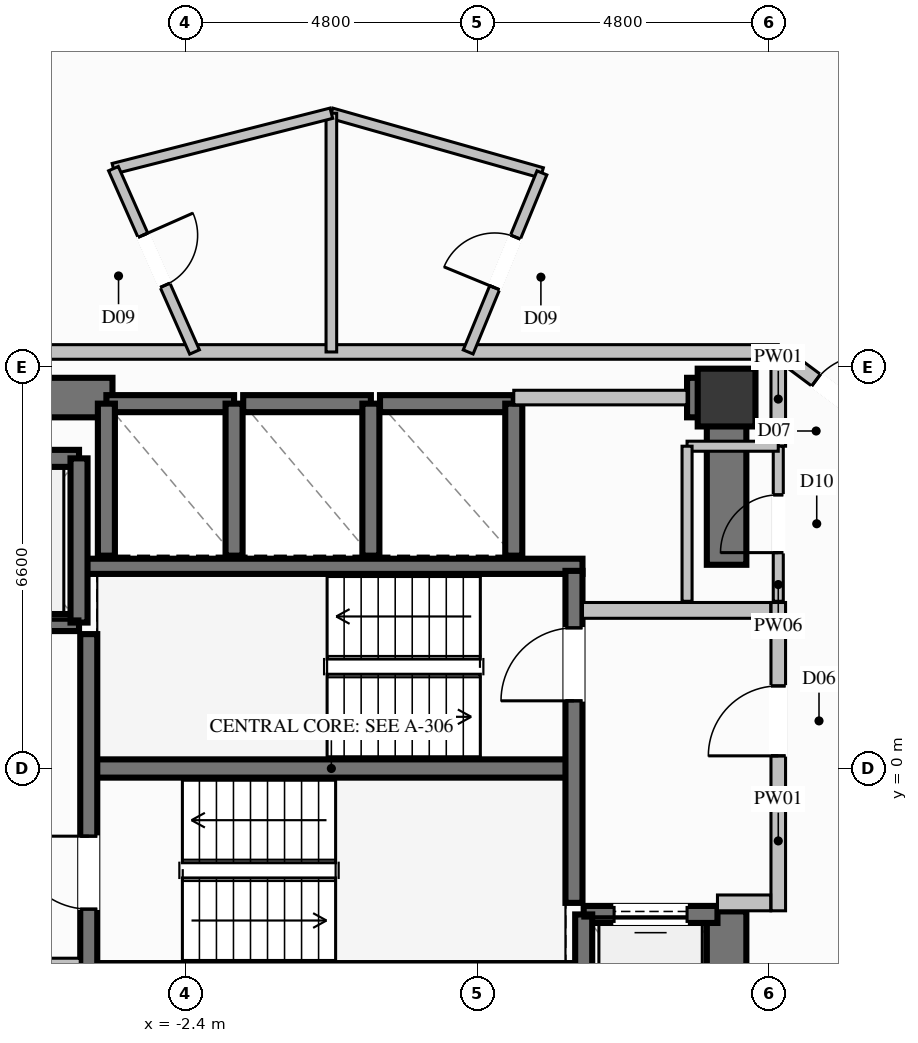
"""IFC4 building model, lengths in metres.
Left out: names, types, materials, properties, quantities, classifications, styles, units other than length and angle.
Written with IfcOpenShell. Run it as: python <this file> out.ifc"""

import sys

from ifc_helpers import new_model, si_unit, direction, frame, frame_2d, origin, origin_2d, place, context, subcontext, project, spatial, rectangle, extrude, element, fill, save


model = new_model("IFC4")
c1 = context("Model", 3, precision=1e-05, world=origin(), true_north=direction((0.0, 1.0)))
c2 = subcontext(c1, "Body", "Model", "MODEL_VIEW")
j1 = project(units=[si_unit("LENGTHUNIT", "METRE"), si_unit("PLANEANGLEUNIT", "RADIAN")], contexts=[c1])
p1 = place(None, origin())
s1 = spatial("IfcSite", under=j1, at=p1, CompositionType="ELEMENT")
p2 = place(p1, origin())
s2 = spatial("IfcBuilding", under=s1, at=p2, CompositionType="ELEMENT")
p3 = place(p2, frame((0.0, 0.0, 102.6)))
s3 = spatial("IfcBuildingStorey", under=s2, at=p3, CompositionType="ELEMENT", Elevation=102.6)
p4 = place(p3, frame((6.5, 6.1, 0.0), z_axis=(0.0, 0.0, 1.0), x_axis=(1.0, 0.0, 0.0)))
e1 = element("IfcColumn", 1, at=p4, inside=s3, PredefinedType="COLUMN", context=c2, shape_type="SweptSolid", body=[
    extrude(rectangle(XDim=0.95, YDim=0.95, at=origin_2d()), origin(), (0.0, 0.0, 1.0), 3.6),
])
p5 = place(p3, frame((-3.99, 0.0, 0.0), z_axis=(0.0, 0.0, 1.0), x_axis=(1.0, 0.0, 0.0)))
e2 = element("IfcWall", 2, at=p5, inside=s3, PredefinedType="SHEAR", context=c2, shape_type="SweptSolid", body=[
    extrude(rectangle(XDim=7.98, YDim=0.3, at=frame_2d((3.99, 0.0))), origin(), (0.0, 0.0, 1.0), 3.6),
])
for number, where, z_axis, x_axis in (
    (3, (-4.13, -3.325, 0.0), (0.0, 0.0, 1.0), (1.0, 0.0, 0.0)),
    (4, (-4.13, 3.325, 0.0), (0.0, 0.0, 1.0), (1.0, 0.0, 0.0)),
):
    element("IfcWall", number, at=place(p3, frame(where, z_axis=z_axis, x_axis=x_axis)), inside=s3, PredefinedType="SOLIDWALL", context=c2, shape_type="SweptSolid", body=[
        extrude(rectangle(XDim=8.26, YDim=0.25, at=frame_2d((4.13, 0.0))), origin(), (0.0, 0.0, 1.0), 3.6),
    ])
p6 = place(p3, frame((-6.175, 6.1, 0.0), z_axis=(0.0, 0.0, 1.0), x_axis=(1.0, 0.0, 0.0)))
e5 = element("IfcWall", 5, at=p6, inside=s3, PredefinedType="SHEAR", context=c2, shape_type="SweptSolid", body=[
    extrude(rectangle(XDim=2.575, YDim=0.65, at=frame_2d((1.288, 0.0))), origin(), (0.0, 0.0, 1.0), 3.6),
])
p7 = place(p3, frame((5.85, 6.1, 0.0), z_axis=(0.0, 0.0, 1.0), x_axis=(1.0, 0.0, 0.0)))
e6 = element("IfcWall", 6, at=p7, inside=s3, PredefinedType="SHEAR", context=c2, shape_type="SweptSolid", body=[
    extrude(rectangle(XDim=0.325, YDim=0.65, at=frame_2d((0.163, 0.0))), origin(), (0.0, 0.0, 1.0), 3.6),
])
p8 = place(p3, frame((6.5, -6.425, 0.0), z_axis=(0.0, 0.0, 1.0), x_axis=(0.0, 1.0, 0.0)))
e7 = element("IfcWall", 7, at=p8, inside=s3, PredefinedType="SHEAR", context=c2, shape_type="SweptSolid", body=[
    extrude(rectangle(XDim=4.075, YDim=0.65, at=frame_2d((2.038, 0.0))), origin(), (0.0, 0.0, 1.0), 3.6),
])
p9 = place(p3, frame((6.5, 3.35, 0.0), z_axis=(0.0, 0.0, 1.0), x_axis=(0.0, 1.0, 0.0)))
e8 = element("IfcWall", 8, at=p9, inside=s3, PredefinedType="SHEAR", context=c2, shape_type="SweptSolid", body=[
    extrude(rectangle(XDim=3.075, YDim=0.65, at=frame_2d((1.538, 0.0))), origin(), (0.0, 0.0, 1.0), 3.6),
])
p10 = place(p3, frame((-1.6, 6.0, 0.0), z_axis=(0.0, 0.0, 1.0), x_axis=(-1.0, 0.0, 0.0)))
e9 = element("IfcWall", 9, at=p10, inside=s3, PredefinedType="SOLIDWALL", context=c2, shape_type="SweptSolid", body=[
    extrude(rectangle(XDim=2.1, YDim=0.28, at=frame_2d((1.05, 0.0))), origin(), (0.0, 0.0, 1.0), 3.35),
])
for number, where, z_axis, x_axis in (
    (10, (-3.7, 6.0, 0.0), (0.0, 0.0, 1.0), (0.0, -1.0, 0.0)),
    (11, (-1.6, 3.5, 0.0), (0.0, 0.0, 1.0), (0.0, 1.0, 0.0)),
):
    element("IfcWall", number, at=place(p3, frame(where, z_axis=z_axis, x_axis=x_axis)), inside=s3, PredefinedType="SOLIDWALL", context=c2, shape_type="SweptSolid", body=[
        extrude(rectangle(XDim=2.5, YDim=0.28, at=frame_2d((1.25, 0.0))), origin(), (0.0, 0.0, 1.0), 3.35),
    ])
p11 = place(p3, frame((0.65, 6.0, 0.0), z_axis=(0.0, 0.0, 1.0), x_axis=(-1.0, 0.0, 0.0)))
e12 = element("IfcWall", 12, at=p11, inside=s3, PredefinedType="SOLIDWALL", context=c2, shape_type="SweptSolid", body=[
    extrude(rectangle(XDim=2.1, YDim=0.28, at=frame_2d((1.05, 0.0))), origin(), (0.0, 0.0, 1.0), 3.35),
])
p12 = place(p3, frame((0.65, 3.5, 0.0), z_axis=(0.0, 0.0, 1.0), x_axis=(0.0, 1.0, 0.0)))
e13 = element("IfcWall", 13, at=p12, inside=s3, PredefinedType="SOLIDWALL", context=c2, shape_type="SweptSolid", body=[
    extrude(rectangle(XDim=2.5, YDim=0.28, at=frame_2d((1.25, 0.0))), origin(), (0.0, 0.0, 1.0), 3.35),
])
p13 = place(p3, frame((3.0, 6.0, 0.0), z_axis=(0.0, 0.0, 1.0), x_axis=(-1.0, 0.0, 0.0)))
e14 = element("IfcWall", 14, at=p13, inside=s3, PredefinedType="SOLIDWALL", context=c2, shape_type="SweptSolid", body=[
    extrude(rectangle(XDim=2.2, YDim=0.28, at=frame_2d((1.1, 0.0))), origin(), (0.0, 0.0, 1.0), 3.35),
])
p14 = place(p3, frame((3.0, 3.5, 0.0), z_axis=(0.0, 0.0, 1.0), x_axis=(0.0, 1.0, 0.0)))
e15 = element("IfcWall", 15, at=p14, inside=s3, PredefinedType="SOLIDWALL", context=c2, shape_type="SweptSolid", body=[
    extrude(rectangle(XDim=2.5, YDim=0.28, at=frame_2d((1.25, 0.0))), origin(), (0.0, 0.0, 1.0), 3.35),
])
p15 = place(p3, frame((-6.35, 2.4, 0.0), z_axis=(0.0, 0.0, 1.0), x_axis=(1.0, 0.0, 0.0)))
e16 = element("IfcWall", 16, at=p15, inside=s3, PredefinedType="SOLIDWALL", context=c2, shape_type="SweptSolid", body=[
    extrude(rectangle(XDim=2.2, YDim=0.28, at=frame_2d((1.1, 0.0))), origin(), (0.0, 0.0, 1.0), 3.35),
])
p16 = place(p15, frame((0.5, 0.0, 0.0)))
e17 = element("IfcOpeningElement", 17, at=p16, cuts=e16, PredefinedType="OPENING", context=c2, shape_type="SweptSolid", body=[
    extrude(rectangle(XDim=1.2, YDim=2.2, at=frame_2d((0.6, 1.1))), frame((0.0, 0.15, 0.0), z_axis=(0.0, -1.0, 0.0), x_axis=(1.0, 0.0, 0.0)), (0.0, 0.0, 1.0), 0.3),
])
p17 = place(p3, frame((-4.15, 5.1, 0.0), z_axis=(0.0, 0.0, 1.0), x_axis=(-1.0, 0.0, 0.0)))
e18 = element("IfcWall", 18, at=p17, inside=s3, PredefinedType="SOLIDWALL", context=c2, shape_type="SweptSolid", body=[
    extrude(rectangle(XDim=2.2, YDim=0.28, at=frame_2d((1.1, 0.0))), origin(), (0.0, 0.0, 1.0), 3.35),
])
p18 = place(p3, frame((-4.15, 2.4, 0.0), z_axis=(0.0, 0.0, 1.0), x_axis=(0.0, 1.0, 0.0)))
e19 = element("IfcWall", 19, at=p18, inside=s3, PredefinedType="SOLIDWALL", context=c2, shape_type="SweptSolid", body=[
    extrude(rectangle(XDim=2.7, YDim=0.28, at=frame_2d((1.35, 0.0))), origin(), (0.0, 0.0, 1.0), 3.35),
])
p19 = place(p3, frame((6.35, -2.4, 0.0), z_axis=(0.0, 0.0, 1.0), x_axis=(-1.0, 0.0, 0.0)))
e20 = element("IfcWall", 20, at=p19, inside=s3, PredefinedType="SOLIDWALL", context=c2, shape_type="SweptSolid", body=[
    extrude(rectangle(XDim=2.2, YDim=0.28, at=frame_2d((1.1, 0.0))), origin(), (0.0, 0.0, 1.0), 3.35),
])
p20 = place(p19, frame((0.5, 0.0, 0.0)))
e21 = element("IfcOpeningElement", 21, at=p20, cuts=e20, PredefinedType="OPENING", context=c2, shape_type="SweptSolid", body=[
    extrude(rectangle(XDim=1.2, YDim=2.2, at=frame_2d((0.6, 1.1))), frame((0.0, 0.15, 0.0), z_axis=(0.0, -1.0, 0.0), x_axis=(1.0, 0.0, 0.0)), (0.0, 0.0, 1.0), 0.3),
])
p21 = place(p3, frame((4.15, -2.4, 0.0), z_axis=(0.0, 0.0, 1.0), x_axis=(0.0, -1.0, 0.0)))
e22 = element("IfcWall", 22, at=p21, inside=s3, PredefinedType="SOLIDWALL", context=c2, shape_type="SweptSolid", body=[
    extrude(rectangle(XDim=2.7, YDim=0.28, at=frame_2d((1.35, 0.0))), origin(), (0.0, 0.0, 1.0), 3.35),
])
p22 = place(p3, frame((-3.99, -3.25, 0.0), z_axis=(0.0, 0.0, 1.0), x_axis=(0.0, 1.0, 0.0)))
e23 = element("IfcWall", 23, at=p22, inside=s3, PredefinedType="SOLIDWALL", context=c2, shape_type="SweptSolid", body=[
    extrude(rectangle(XDim=5.46, YDim=0.28, at=frame_2d((2.73, 0.0))), origin(), (0.0, 0.0, 1.0), 3.35),
])
p23 = place(p22, frame((0.937, 0.0, 0.0)))
e24 = element("IfcOpeningElement", 24, at=p23, cuts=e23, PredefinedType="OPENING", context=c2, shape_type="SweptSolid", body=[
    extrude(rectangle(XDim=1.2, YDim=2.2, at=frame_2d((0.6, 1.1))), frame((0.0, 0.15, 0.0), z_axis=(0.0, -1.0, 0.0), x_axis=(1.0, 0.0, 0.0)), (0.0, 0.0, 1.0), 0.3),
])
p24 = place(p3, frame((3.99, -2.21, 0.0), z_axis=(0.0, 0.0, 1.0), x_axis=(0.0, 1.0, 0.0)))
e25 = element("IfcWall", 25, at=p24, inside=s3, PredefinedType="SOLIDWALL", context=c2, shape_type="SweptSolid", body=[
    extrude(rectangle(XDim=5.46, YDim=0.28, at=frame_2d((2.73, 0.0))), origin(), (0.0, 0.0, 1.0), 3.35),
])
p25 = place(p24, frame((3.323, 0.0, 0.0)))
e26 = element("IfcOpeningElement", 26, at=p25, cuts=e25, PredefinedType="OPENING", context=c2, shape_type="SweptSolid", body=[
    extrude(rectangle(XDim=1.2, YDim=2.2, at=frame_2d((0.6, 1.1))), frame((0.0, 0.15, 0.0), z_axis=(0.0, -1.0, 0.0), x_axis=(1.0, 0.0, 0.0)), (0.0, 0.0, 1.0), 0.3),
])
p26 = place(p3, frame((-7.225, -3.25, 0.0), z_axis=(0.0, 0.0, 1.0), x_axis=(1.0, 0.0, 0.0)))
e27 = element("IfcWall", 27, at=p26, inside=s3, PredefinedType="PARTITIONING", context=c2, shape_type="SweptSolid", body=[
    extrude(rectangle(XDim=3.095, YDim=0.26, at=frame_2d((1.548, 0.0))), origin(), (0.0, 0.0, 1.0), 3.35),
])
p27 = place(p3, frame((7.35, -2.34, 0.0), z_axis=(0.0, 0.0, 1.0), x_axis=(0.0, 1.0, 0.0)))
e28 = element("IfcWall", 28, at=p27, inside=s3, PredefinedType="PARTITIONING", context=c2, shape_type="SweptSolid", body=[
    extrude(rectangle(XDim=5.07, YDim=0.24, at=frame_2d((2.535, 0.0))), origin(), (0.0, 0.0, 1.0), 2.435),
])
p28 = place(p27, frame((2.548, 0.0, 0.0)))
e29 = element("IfcOpeningElement", 29, at=p28, cuts=e28, PredefinedType="OPENING", context=c2, shape_type="SweptSolid", body=[
    extrude(rectangle(XDim=1.15, YDim=2.2, at=frame_2d((0.575, 1.1))), frame((0.0, 0.13, 0.0), z_axis=(0.0, -1.0, 0.0), x_axis=(1.0, 0.0, 0.0)), (0.0, 0.0, 1.0), 0.26),
])
p29 = place(p3, frame((6.35, -2.21, 0.0), z_axis=(0.0, 0.0, 1.0), x_axis=(1.0, 0.0, 0.0)))
e30 = element("IfcWall", 30, at=p29, inside=s3, PredefinedType="PARTITIONING", context=c2, shape_type="SweptSolid", body=[
    extrude(rectangle(XDim=0.875, YDim=0.26, at=frame_2d((0.438, 0.0))), origin(), (0.0, 0.0, 1.0), 3.35),
])
p30 = place(p3, frame((4.13, 2.6, 0.0), z_axis=(0.0, 0.0, 1.0), x_axis=(1.0, 0.0, 0.0)))
e31 = element("IfcWall", 31, at=p30, inside=s3, PredefinedType="PARTITIONING", context=c2, shape_type="SweptSolid", body=[
    extrude(rectangle(XDim=3.095, YDim=0.26, at=frame_2d((1.548, 0.0))), origin(), (0.0, 0.0, 1.0), 3.35),
])
p31 = place(p3, frame((-7.35, 6.85, 0.0), z_axis=(0.0, 0.0, 1.0), x_axis=(1.0, 0.0, 0.0)))
e32 = element("IfcWall", 32, at=p31, inside=s3, PredefinedType="PARTITIONING", context=c2, shape_type="SweptSolid", body=[
    extrude(rectangle(XDim=14.7, YDim=0.24, at=frame_2d((7.35, 0.0))), origin(), (0.0, 0.0, 1.0), 2.435),
])
p32 = place(p3, frame((7.35, 5.3, 0.0), z_axis=(0.0, 0.0, 1.0), x_axis=(0.0, 1.0, 0.0)))
e33 = element("IfcWall", 33, at=p32, inside=s3, PredefinedType="PARTITIONING", context=c2, shape_type="SweptSolid", body=[
    extrude(rectangle(XDim=1.55, YDim=0.24, at=frame_2d((0.775, 0.0))), origin(), (0.0, 0.0, 1.0), 2.435),
])
p33 = place(p3, frame((3.0, 6.1, 0.0), z_axis=(0.0, 0.0, 1.0), x_axis=(1.0, 0.0, 0.0)))
e34 = element("IfcWall", 34, at=p33, inside=s3, PredefinedType="PARTITIONING", context=c2, shape_type="SweptSolid", body=[
    extrude(rectangle(XDim=2.85, YDim=0.24, at=frame_2d((1.425, 0.0))), origin(), (0.0, 0.0, 1.0), 2.435),
])
p34 = place(p3, frame((7.35, 2.75, 0.0), z_axis=(0.0, 0.0, 1.0), x_axis=(0.0, 1.0, 0.0)))
e35 = element("IfcWall", 35, at=p34, inside=s3, PredefinedType="PARTITIONING", context=c2, shape_type="SweptSolid", body=[
    extrude(rectangle(XDim=2.55, YDim=0.165, at=frame_2d((1.275, 0.0))), origin(), (0.0, 0.0, 1.0), 3.35),
])
p35 = place(p34, frame((0.8, 0.0, 0.0)))
e36 = element("IfcOpeningElement", 36, at=p35, cuts=e35, PredefinedType="OPENING", context=c2, shape_type="SweptSolid", body=[
    extrude(rectangle(XDim=0.95, YDim=2.1, at=frame_2d((0.475, 1.05))), frame((0.0, 0.093, 0.0), z_axis=(0.0, -1.0, 0.0), x_axis=(1.0, 0.0, 0.0)), (0.0, 0.0, 1.0), 0.185),
])
p36 = place(p3, frame((7.35, 5.3, 0.0), z_axis=(0.0, 0.0, 1.0), x_axis=(-1.0, 0.0, 0.0)))
e37 = element("IfcWall", 37, at=p36, inside=s3, PredefinedType="PARTITIONING", context=c2, shape_type="SweptSolid", body=[
    extrude(rectangle(XDim=1.5, YDim=0.165, at=frame_2d((0.75, 0.0))), origin(), (0.0, 0.0, 1.0), 2.435),
])
p37 = place(p3, frame((5.85, 5.3, 0.0), z_axis=(0.0, 0.0, 1.0), x_axis=(0.0, -1.0, 0.0)))
e38 = element("IfcWall", 38, at=p37, inside=s3, PredefinedType="PARTITIONING", context=c2, shape_type="SweptSolid", body=[
    extrude(rectangle(XDim=2.55, YDim=0.165, at=frame_2d((1.275, 0.0))), origin(), (0.0, 0.0, 1.0), 2.435),
])
p38 = place(p3, frame((0.0, 10.776, 0.0), z_axis=(0.0, 0.0, 1.0), x_axis=(0.962140957865, -0.272552338459, 0.0)))
e39 = element("IfcWall", 39, at=p38, inside=s3, PredefinedType="PLUMBINGWALL", context=c2, shape_type="SweptSolid", body=[
    extrude(rectangle(XDim=3.599, YDim=0.175, at=frame_2d((1.8, 0.0))), origin(), (0.0, 0.0, 1.0), 2.985),
])
p39 = place(p3, frame((0.0, 10.776, 0.0), z_axis=(0.0, 0.0, 1.0), x_axis=(0.0, -1.0, 0.0)))
e40 = element("IfcWall", 40, at=p39, inside=s3, PredefinedType="PLUMBINGWALL", context=c2, shape_type="SweptSolid", body=[
    extrude(rectangle(XDim=3.926, YDim=0.175, at=frame_2d((1.963, 0.0))), origin(), (0.0, 0.0, 1.0), 3.35),
])
p40 = place(p3, frame((2.25, 6.85, 0.0), z_axis=(0.0, 0.0, 1.0), x_axis=(0.380834625893, 0.924643167779, 0.0)))
e41 = element("IfcWall", 41, at=p40, inside=s3, PredefinedType="PLUMBINGWALL", context=c2, shape_type="SweptSolid", body=[
    extrude(rectangle(XDim=3.185, YDim=0.175, at=frame_2d((1.592, 0.0))), origin(), (0.0, 0.0, 1.0), 3.35),
])
p41 = place(p40, frame((1.143, 0.0, 0.0)))
e42 = element("IfcOpeningElement", 42, at=p41, cuts=e41, PredefinedType="OPENING", context=c2, shape_type="SweptSolid", body=[
    extrude(rectangle(XDim=0.9, YDim=2.1, at=frame_2d((0.45, 1.05))), frame((0.0, 0.098, 0.0), z_axis=(0.0, -1.0, 0.0), x_axis=(1.0, 0.0, 0.0)), (0.0, 0.0, 1.0), 0.195),
])
p42 = place(p3, frame((7.35, 6.85, 0.0), z_axis=(0.0, 0.0, 1.0), x_axis=(0.8017416961, -0.597670689205, 0.0)))
e43 = element("IfcWall", 43, at=p42, inside=s3, PredefinedType="PARTITIONING", context=c2, shape_type="SweptSolid", body=[
    extrude(rectangle(XDim=2.552, YDim=0.24, at=frame_2d((1.276, 0.0))), origin(), (0.0, 0.0, 1.0), 3.35),
])
p43 = place(p42, frame((0.776, 0.0, 0.0)))
e44 = element("IfcOpeningElement", 44, at=p43, cuts=e43, PredefinedType="OPENING", context=c2, shape_type="SweptSolid", body=[
    extrude(rectangle(XDim=1.0, YDim=2.2, at=frame_2d((0.5, 1.1))), frame((0.0, 0.13, 0.0), z_axis=(0.0, -1.0, 0.0), x_axis=(1.0, 0.0, 0.0)), (0.0, 0.0, 1.0), 0.26),
])
p44 = place(p3, frame((-3.584, 9.865, 0.0), z_axis=(0.0, 0.0, 1.0), x_axis=(0.969187500781, 0.246324152957, 0.0)))
e45 = element("IfcWall", 45, at=p44, inside=s3, PredefinedType="PLUMBINGWALL", context=c2, shape_type="SweptSolid", body=[
    extrude(rectangle(XDim=3.698, YDim=0.175, at=frame_2d((1.849, 0.0))), origin(), (0.0, 0.0, 1.0), 2.985),
])
p45 = place(p3, frame((-3.584, 9.865, 0.0), z_axis=(0.0, 0.0, 1.0), x_axis=(0.404626310395, -0.914482120621, 0.0)))
e46 = element("IfcWall", 46, at=p45, inside=s3, PredefinedType="PLUMBINGWALL", context=c2, shape_type="SweptSolid", body=[
    extrude(rectangle(XDim=3.297, YDim=0.175, at=frame_2d((1.648, 0.0))), origin(), (0.0, 0.0, 1.0), 3.35),
])
p46 = place(p45, frame((1.198, 0.0, 0.0)))
e47 = element("IfcOpeningElement", 47, at=p46, cuts=e46, PredefinedType="OPENING", context=c2, shape_type="SweptSolid", body=[
    extrude(rectangle(XDim=0.9, YDim=2.1, at=frame_2d((0.45, 1.05))), frame((0.0, 0.098, 0.0), z_axis=(0.0, -1.0, 0.0), x_axis=(1.0, 0.0, 0.0)), (0.0, 0.0, 1.0), 0.195),
])
p47 = place(p20, origin())
e48 = element("IfcDoor", 48, at=p47, inside=s3, OperationType="SLIDING_TO_LEFT", PredefinedType="DOOR", context=c2, shape_type="SweptSolid", body=[
    extrude(rectangle(XDim=1.2, YDim=2.2, at=frame_2d((0.6, 1.1))), frame((0.0, 0.025, 0.0), z_axis=(0.0, -1.0, 0.0), x_axis=(1.0, 0.0, 0.0)), (0.0, 0.0, 1.0), 0.05),
])
fill(e21, e48)
p48 = place(p23, origin())
e49 = element("IfcDoor", 49, at=p48, inside=s3, OperationType="SINGLE_SWING_RIGHT", PredefinedType="DOOR", context=c2, shape_type="SweptSolid", body=[
    extrude(rectangle(XDim=1.2, YDim=2.2, at=frame_2d((0.6, 1.1))), frame((0.0, 0.025, 0.0), z_axis=(0.0, -1.0, 0.0), x_axis=(1.0, 0.0, 0.0)), (0.0, 0.0, 1.0), 0.05),
])
fill(e24, e49)
p49 = place(p25, origin())
e50 = element("IfcDoor", 50, at=p49, inside=s3, OperationType="SINGLE_SWING_LEFT", PredefinedType="DOOR", context=c2, shape_type="SweptSolid", body=[
    extrude(rectangle(XDim=1.2, YDim=2.2, at=frame_2d((0.6, 1.1))), frame((0.0, 0.025, 0.0), z_axis=(0.0, -1.0, 0.0), x_axis=(1.0, 0.0, 0.0)), (0.0, 0.0, 1.0), 0.05),
])
fill(e26, e50)
p50 = place(p28, origin())
e51 = element("IfcDoor", 51, at=p50, inside=s3, OperationType="SINGLE_SWING_LEFT", PredefinedType="DOOR", context=c2, shape_type="SweptSolid", body=[
    extrude(rectangle(XDim=1.15, YDim=2.2, at=frame_2d((0.575, 1.1))), frame((0.0, 0.025, 0.0), z_axis=(0.0, -1.0, 0.0), x_axis=(1.0, 0.0, 0.0)), (0.0, 0.0, 1.0), 0.05),
])
fill(e29, e51)
p51 = place(p35, origin())
e52 = element("IfcDoor", 52, at=p51, inside=s3, OperationType="SINGLE_SWING_LEFT", PredefinedType="DOOR", context=c2, shape_type="SweptSolid", body=[
    extrude(rectangle(XDim=0.95, YDim=2.1, at=frame_2d((0.475, 1.05))), frame((0.0, 0.025, 0.0), z_axis=(0.0, -1.0, 0.0), x_axis=(1.0, 0.0, 0.0)), (0.0, 0.0, 1.0), 0.05),
])
fill(e36, e52)
p52 = place(p41, origin())
e53 = element("IfcDoor", 53, at=p52, inside=s3, OperationType="SINGLE_SWING_LEFT", PredefinedType="DOOR", context=c2, shape_type="SweptSolid", body=[
    extrude(rectangle(XDim=0.9, YDim=2.1, at=frame_2d((0.45, 1.05))), frame((0.0, 0.025, 0.0), z_axis=(0.0, -1.0, 0.0), x_axis=(1.0, 0.0, 0.0)), (0.0, 0.0, 1.0), 0.05),
])
fill(e42, e53)
p53 = place(p43, origin())
e54 = element("IfcDoor", 54, at=p53, inside=s3, OperationType="SINGLE_SWING_RIGHT", PredefinedType="DOOR", context=c2, shape_type="SweptSolid", body=[
    extrude(rectangle(XDim=1.0, YDim=2.2, at=frame_2d((0.5, 1.1))), frame((0.0, 0.025, 0.0), z_axis=(0.0, -1.0, 0.0), x_axis=(1.0, 0.0, 0.0)), (0.0, 0.0, 1.0), 0.05),
])
fill(e44, e54)
p54 = place(p46, origin())
e55 = element("IfcDoor", 55, at=p54, inside=s3, OperationType="SINGLE_SWING_LEFT", PredefinedType="DOOR", context=c2, shape_type="SweptSolid", body=[
    extrude(rectangle(XDim=0.9, YDim=2.1, at=frame_2d((0.45, 1.05))), frame((0.0, 0.025, 0.0), z_axis=(0.0, -1.0, 0.0), x_axis=(1.0, 0.0, 0.0)), (0.0, 0.0, 1.0), 0.05),
])
fill(e47, e55)
save(model, sys.argv[1])
